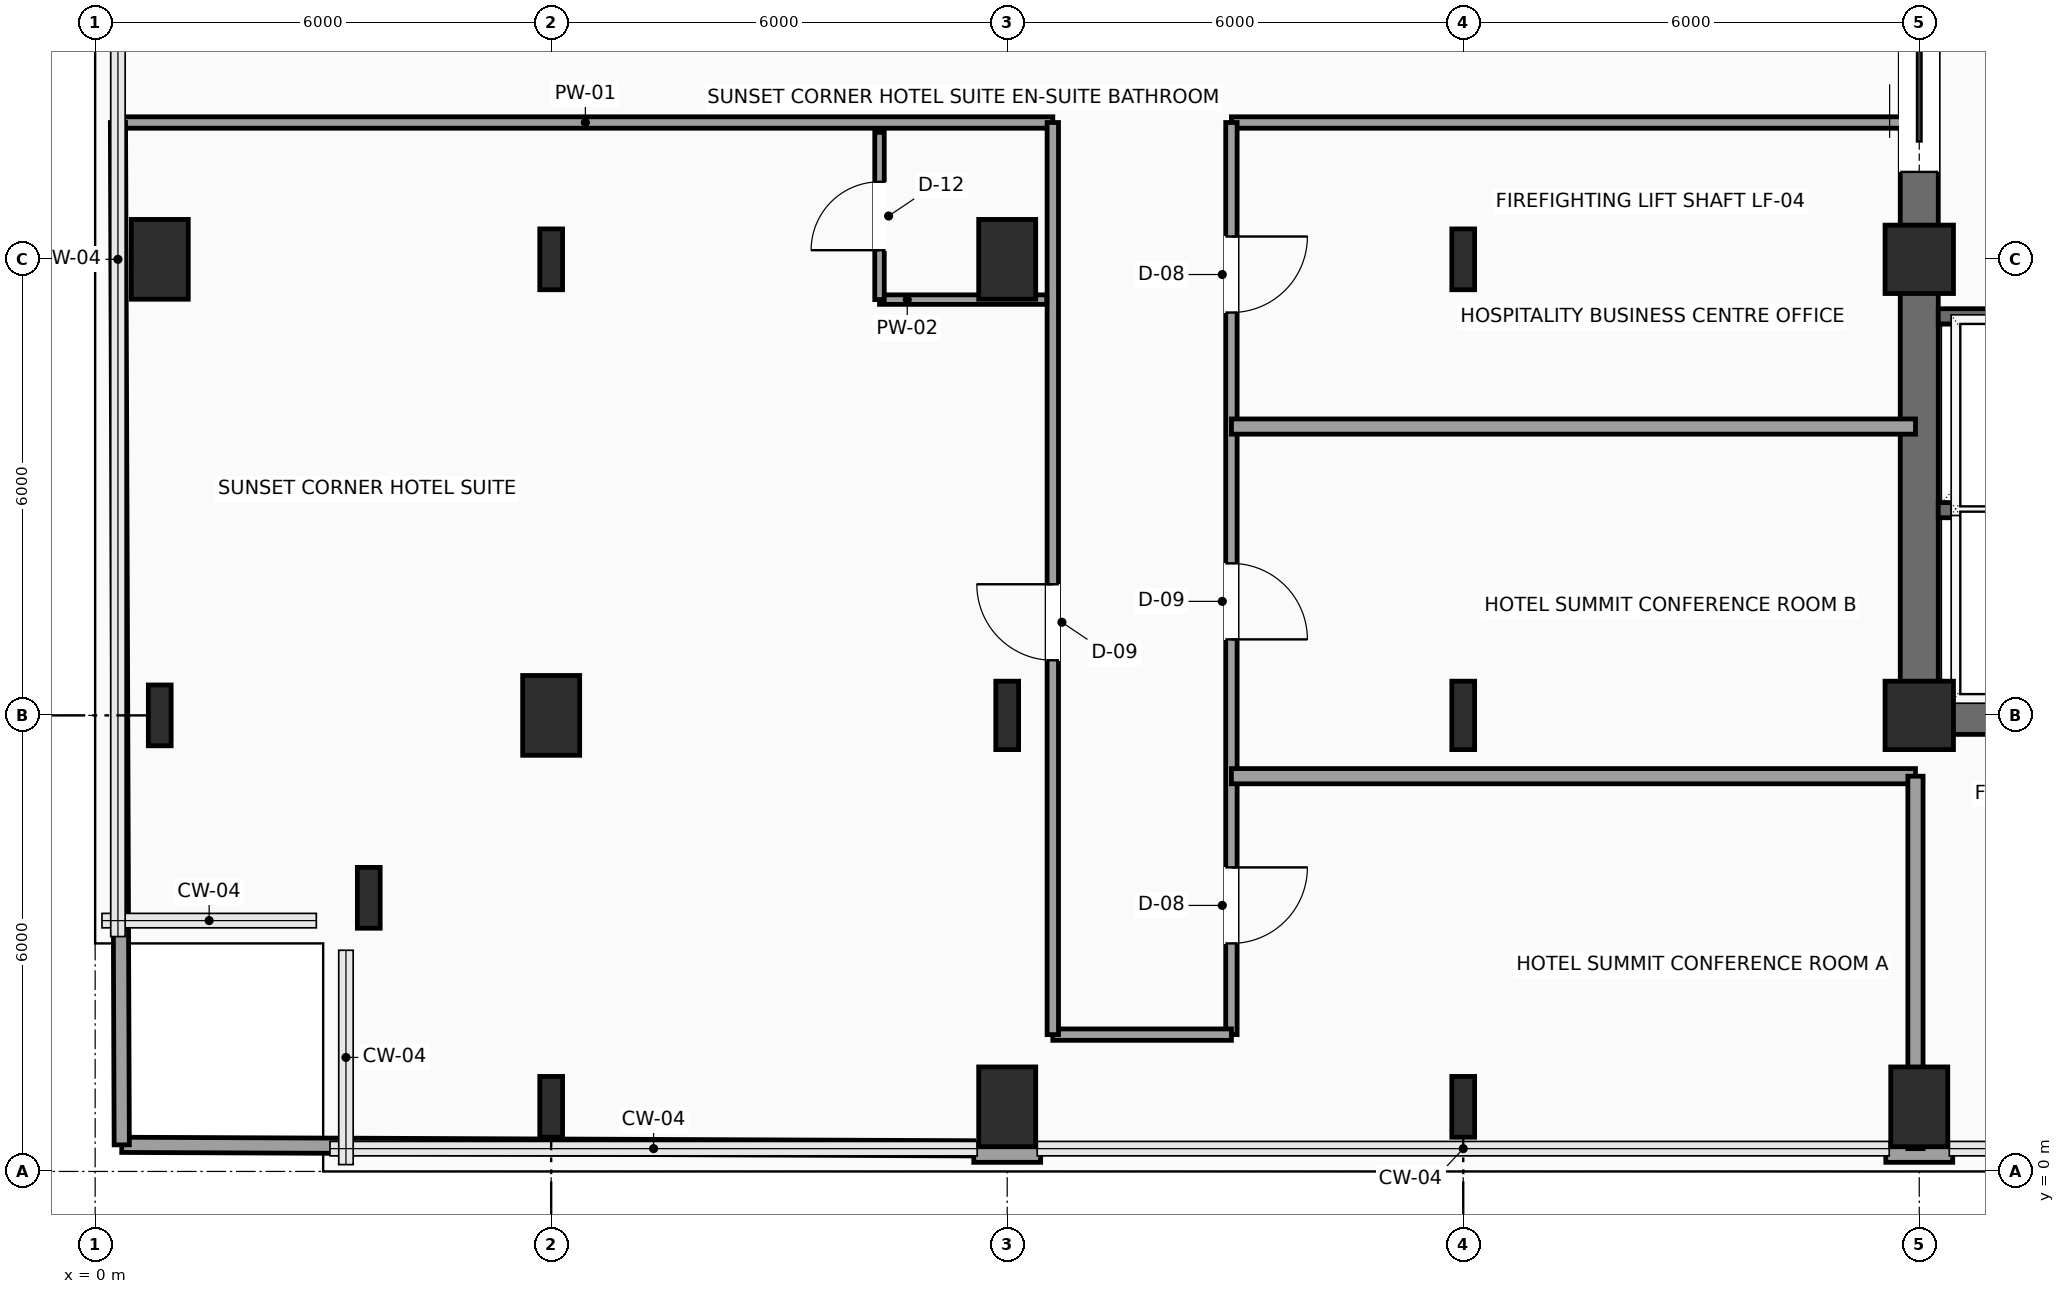
"""IFC4 building model, lengths in metres.
Left out: names, types, materials, properties, quantities, classifications, styles, units other than length and angle.
Written with IfcOpenShell. Run it as: python <this file> out.ifc"""

import sys

from ifc_helpers import new_model, si_unit, direction, frame, frame_2d, origin, origin_2d, place, context, subcontext, project, spatial, rectangle, i_section, extrude, element, fill, save


model = new_model("IFC4")
c1 = context("Model", 3, precision=1e-05, world=origin(), true_north=direction((0.0, 1.0)))
c2 = subcontext(c1, "Body", "Model", "MODEL_VIEW")
j1 = project(units=[si_unit("LENGTHUNIT", "METRE"), si_unit("PLANEANGLEUNIT", "RADIAN")], contexts=[c1])
p1 = place(None, origin())
s1 = spatial("IfcSite", under=j1, at=p1, CompositionType="ELEMENT")
p2 = place(p1, origin())
s2 = spatial("IfcBuilding", under=s1, at=p2, CompositionType="ELEMENT")
p3 = place(p2, frame((0.0, 0.0, 227.4)))
s3 = spatial("IfcBuildingStorey", under=s2, at=p3, CompositionType="ELEMENT", Elevation=227.4)
for number, where, z_axis, x_axis in (
    (1, (24.0, 6.0, 0.0), (0.0, 0.0, 1.0), (1.0, 0.0, 0.0)),
    (2, (24.0, 12.0, 0.0), (0.0, 0.0, 1.0), (1.0, 0.0, 0.0)),
):
    element("IfcColumn", number, at=place(p3, frame(where, z_axis=z_axis, x_axis=x_axis)), inside=s3, PredefinedType="COLUMN", context=c2, shape_type="SweptSolid", body=[
        extrude(rectangle(XDim=0.9, YDim=0.9, at=origin_2d()), origin(), (0.0, 0.0, 1.0), 3.75),
    ])
for number, where, z_axis, x_axis in (
    (3, (3.6, 3.6, 0.0), (0.0, 0.0, 1.0), (1.0, 0.0, 0.0)),
    (4, (0.85, 6.0, 0.0), (0.0, 0.0, 1.0), (1.0, 0.0, 0.0)),
):
    element("IfcColumn", number, at=place(p3, frame(where, z_axis=z_axis, x_axis=x_axis)), inside=s3, PredefinedType="COLUMN", context=c2, shape_type="SweptSolid", body=[
        extrude(i_section(OverallWidth=0.3, OverallDepth=0.8, WebThickness=0.018, FlangeThickness=0.033, FilletRadius=0.03, at=origin_2d()), origin(), (0.0, 0.0, 1.0), 3.75),
    ])
p4 = place(p3, frame((0.85, 12.0, 0.0), z_axis=(0.0, 0.0, 1.0), x_axis=(1.0, 0.0, 0.0)))
e5 = element("IfcColumn", 5, at=p4, inside=s3, PredefinedType="COLUMN", context=c2, shape_type="SweptSolid", body=[
    extrude(rectangle(XDim=0.75, YDim=1.05, at=origin_2d()), origin(), (0.0, 0.0, 1.0), 3.75),
])
p5 = place(p3, frame((6.0, 0.85, 0.0), z_axis=(0.0, 0.0, 1.0), x_axis=(1.0, 0.0, 0.0)))
e6 = element("IfcColumn", 6, at=p5, inside=s3, PredefinedType="COLUMN", context=c2, shape_type="SweptSolid", body=[
    extrude(i_section(OverallWidth=0.3, OverallDepth=0.8, WebThickness=0.018, FlangeThickness=0.033, FilletRadius=0.03, at=origin_2d()), origin(), (0.0, 0.0, 1.0), 3.75),
])
p6 = place(p3, frame((6.0, 6.0, 0.0), z_axis=(0.0, 0.0, 1.0), x_axis=(1.0, 0.0, 0.0)))
e7 = element("IfcColumn", 7, at=p6, inside=s3, PredefinedType="COLUMN", context=c2, shape_type="SweptSolid", body=[
    extrude(rectangle(XDim=0.75, YDim=1.05, at=origin_2d()), origin(), (0.0, 0.0, 1.0), 3.75),
])
p7 = place(p3, frame((6.0, 12.0, 0.0), z_axis=(0.0, 0.0, 1.0), x_axis=(1.0, 0.0, 0.0)))
e8 = element("IfcColumn", 8, at=p7, inside=s3, PredefinedType="COLUMN", context=c2, shape_type="SweptSolid", body=[
    extrude(i_section(OverallWidth=0.3, OverallDepth=0.8, WebThickness=0.018, FlangeThickness=0.033, FilletRadius=0.03, at=origin_2d()), origin(), (0.0, 0.0, 1.0), 3.75),
])
p8 = place(p3, frame((12.0, 0.85, 0.0), z_axis=(0.0, 0.0, 1.0), x_axis=(1.0, 0.0, 0.0)))
e9 = element("IfcColumn", 9, at=p8, inside=s3, PredefinedType="COLUMN", context=c2, shape_type="SweptSolid", body=[
    extrude(rectangle(XDim=0.75, YDim=1.05, at=origin_2d()), origin(), (0.0, 0.0, 1.0), 3.75),
])
p9 = place(p3, frame((12.0, 6.0, 0.0), z_axis=(0.0, 0.0, 1.0), x_axis=(1.0, 0.0, 0.0)))
e10 = element("IfcColumn", 10, at=p9, inside=s3, PredefinedType="COLUMN", context=c2, shape_type="SweptSolid", body=[
    extrude(i_section(OverallWidth=0.3, OverallDepth=0.9, WebThickness=0.019, FlangeThickness=0.035, FilletRadius=0.03, at=origin_2d()), origin(), (0.0, 0.0, 1.0), 3.75),
])
p10 = place(p3, frame((12.0, 12.0, 0.0), z_axis=(0.0, 0.0, 1.0), x_axis=(1.0, 0.0, 0.0)))
e11 = element("IfcColumn", 11, at=p10, inside=s3, PredefinedType="COLUMN", context=c2, shape_type="SweptSolid", body=[
    extrude(rectangle(XDim=0.75, YDim=1.05, at=origin_2d()), origin(), (0.0, 0.0, 1.0), 3.75),
])
p11 = place(p3, frame((18.0, 0.85, 0.0), z_axis=(0.0, 0.0, 1.0), x_axis=(1.0, 0.0, 0.0)))
e12 = element("IfcColumn", 12, at=p11, inside=s3, PredefinedType="COLUMN", context=c2, shape_type="SweptSolid", body=[
    extrude(i_section(OverallWidth=0.3, OverallDepth=0.8, WebThickness=0.018, FlangeThickness=0.033, FilletRadius=0.03, at=origin_2d()), origin(), (0.0, 0.0, 1.0), 3.75),
])
p12 = place(p3, frame((18.0, 6.0, 0.0), z_axis=(0.0, 0.0, 1.0), x_axis=(1.0, 0.0, 0.0)))
e13 = element("IfcColumn", 13, at=p12, inside=s3, PredefinedType="COLUMN", context=c2, shape_type="SweptSolid", body=[
    extrude(i_section(OverallWidth=0.3, OverallDepth=0.9, WebThickness=0.019, FlangeThickness=0.035, FilletRadius=0.03, at=origin_2d()), origin(), (0.0, 0.0, 1.0), 3.75),
])
p13 = place(p3, frame((18.0, 12.0, 0.0), z_axis=(0.0, 0.0, 1.0), x_axis=(1.0, 0.0, 0.0)))
e14 = element("IfcColumn", 14, at=p13, inside=s3, PredefinedType="COLUMN", context=c2, shape_type="SweptSolid", body=[
    extrude(i_section(OverallWidth=0.3, OverallDepth=0.8, WebThickness=0.018, FlangeThickness=0.033, FilletRadius=0.03, at=origin_2d()), origin(), (0.0, 0.0, 1.0), 3.75),
])
p14 = place(p3, frame((24.0, 0.85, 0.0), z_axis=(0.0, 0.0, 1.0), x_axis=(1.0, 0.0, 0.0)))
e15 = element("IfcColumn", 15, at=p14, inside=s3, PredefinedType="COLUMN", context=c2, shape_type="SweptSolid", body=[
    extrude(rectangle(XDim=0.75, YDim=1.05, at=origin_2d()), origin(), (0.0, 0.0, 1.0), 3.75),
])
for number, where, z_axis, x_axis in (
    (16, (24.44, 0.24, 0.0), (0.0, 0.0, 1.0), (-1.0, 0.0, 0.0)),
    (17, (12.44, 0.24, 0.0), (0.0, 0.0, 1.0), (-1.0, 0.0, 0.0)),
):
    element("IfcWall", number, at=place(p3, frame(where, z_axis=z_axis, x_axis=x_axis)), inside=s3, PredefinedType="SOLIDWALL", context=c2, shape_type="SweptSolid", body=[
        extrude(rectangle(XDim=0.88, YDim=0.24, at=frame_2d((0.44, 0.0))), origin(), (0.0, 0.0, 1.0), 3.54),
    ])
p15 = place(p3, frame((24.0, 6.0, 0.0), z_axis=(0.0, 0.0, 1.0), x_axis=(1.0, 0.0, 0.0)))
e18 = element("IfcWall", 18, at=p15, inside=s3, PredefinedType="SHEAR", context=c2, shape_type="SweptSolid", body=[
    extrude(rectangle(XDim=9.6, YDim=0.5, at=frame_2d((4.8, 0.0))), origin(), (0.0, 0.0, 1.0), 3.54),
])
p16 = place(p3, frame((24.0, 6.0, 0.0), z_axis=(0.0, 0.0, 1.0), x_axis=(0.0, 1.0, 0.0)))
e19 = element("IfcWall", 19, at=p16, inside=s3, PredefinedType="SHEAR", context=c2, shape_type="SweptSolid", body=[
    extrude(rectangle(XDim=12.0, YDim=0.5, at=frame_2d((6.0, 0.0))), origin(), (0.0, 0.0, 1.0), 3.54),
])
p17 = place(p16, frame((7.15, 0.0, 0.0)))
e20 = element("IfcOpeningElement", 20, at=p17, cuts=e19, PredefinedType="OPENING", context=c2, shape_type="SweptSolid", body=[
    extrude(rectangle(XDim=1.6, YDim=2.3, at=frame_2d((0.8, 1.15))), frame((0.0, 0.26, 0.0), z_axis=(0.0, -1.0, 0.0), x_axis=(1.0, 0.0, 0.0)), (0.0, 0.0, 1.0), 0.52),
])
for number, where, z_axis, x_axis in (
    (21, (24.25, 8.7, 0.0), (0.0, 0.0, 1.0), (1.0, 0.0, 0.0)),
    (22, (24.25, 11.25, 0.0), (0.0, 0.0, 1.0), (1.0, 0.0, 0.0)),
):
    element("IfcWall", number, at=place(p3, frame(where, z_axis=z_axis, x_axis=x_axis)), inside=s3, PredefinedType="SHEAR", context=c2, shape_type="SweptSolid", body=[
        extrude(rectangle(XDim=2.17, YDim=0.2, at=frame_2d((1.085, 0.0))), origin(), (0.0, 0.0, 1.0), 3.54),
    ])
p18 = place(p3, frame((12.6, 13.8, 0.0), z_axis=(0.0, 0.0, 1.0), x_axis=(-1.0, 0.0, 0.0)))
e23 = element("IfcWall", 23, at=p18, inside=s3, PredefinedType="PARTITIONING", context=c2, shape_type="SweptSolid", body=[
    extrude(rectangle(XDim=12.3, YDim=0.15, at=frame_2d((6.15, 0.0))), origin(), (0.0, 0.0, 1.0), 3.54),
])
p19 = place(p3, frame((23.95, 13.8, 0.0), z_axis=(0.0, 0.0, 1.0), x_axis=(-1.0, 0.0, 0.0)))
e24 = element("IfcWall", 24, at=p19, inside=s3, PredefinedType="PARTITIONING", context=c2, shape_type="SweptSolid", body=[
    extrude(rectangle(XDim=9.0, YDim=0.15, at=frame_2d((4.5, 0.0))), origin(), (0.0, 0.0, 1.0), 3.54),
])
p20 = place(p3, frame((14.95, 13.8, 0.0), z_axis=(0.0, 0.0, 1.0), x_axis=(0.0, -1.0, 0.0)))
e25 = element("IfcWall", 25, at=p20, inside=s3, PredefinedType="PARTITIONING", context=c2, shape_type="SweptSolid", body=[
    extrude(rectangle(XDim=12.0, YDim=0.15, at=frame_2d((6.0, 0.0))), origin(), (0.0, 0.0, 1.0), 3.54),
])
p21 = place(p20, frame((9.8, 0.0, 0.0)))
e26 = element("IfcOpeningElement", 26, at=p21, cuts=e25, PredefinedType="OPENING", context=c2, shape_type="SweptSolid", body=[
    extrude(rectangle(XDim=1.0, YDim=2.2, at=frame_2d((0.5, 1.1))), frame((0.0, 0.085, 0.0), z_axis=(0.0, -1.0, 0.0), x_axis=(1.0, 0.0, 0.0)), (0.0, 0.0, 1.0), 0.17),
])
p22 = place(p20, frame((5.8, 0.0, 0.0)))
e27 = element("IfcOpeningElement", 27, at=p22, cuts=e25, PredefinedType="OPENING", context=c2, shape_type="SweptSolid", body=[
    extrude(rectangle(XDim=1.0, YDim=2.2, at=frame_2d((0.5, 1.1))), frame((0.0, 0.085, 0.0), z_axis=(0.0, -1.0, 0.0), x_axis=(1.0, 0.0, 0.0)), (0.0, 0.0, 1.0), 0.17),
])
p23 = place(p20, frame((1.5, 0.0, 0.0)))
e28 = element("IfcOpeningElement", 28, at=p23, cuts=e25, PredefinedType="OPENING", context=c2, shape_type="SweptSolid", body=[
    extrude(rectangle(XDim=1.0, YDim=2.2, at=frame_2d((0.5, 1.1))), frame((0.0, 0.085, 0.0), z_axis=(0.0, -1.0, 0.0), x_axis=(1.0, 0.0, 0.0)), (0.0, 0.0, 1.0), 0.17),
])
p24 = place(p3, frame((14.95, 1.8, 0.0), z_axis=(0.0, 0.0, 1.0), x_axis=(-1.0, 0.0, 0.0)))
e29 = element("IfcWall", 29, at=p24, inside=s3, PredefinedType="PARTITIONING", context=c2, shape_type="SweptSolid", body=[
    extrude(rectangle(XDim=2.35, YDim=0.15, at=frame_2d((1.175, 0.0))), origin(), (0.0, 0.0, 1.0), 3.54),
])
p25 = place(p3, frame((12.6, 1.8, 0.0), z_axis=(0.0, 0.0, 1.0), x_axis=(0.0, 1.0, 0.0)))
e30 = element("IfcWall", 30, at=p25, inside=s3, PredefinedType="PARTITIONING", context=c2, shape_type="SweptSolid", body=[
    extrude(rectangle(XDim=12.0, YDim=0.15, at=frame_2d((6.0, 0.0))), origin(), (0.0, 0.0, 1.0), 3.54),
])
p26 = place(p25, frame((4.925, 0.0, 0.0)))
e31 = element("IfcOpeningElement", 31, at=p26, cuts=e30, PredefinedType="OPENING", context=c2, shape_type="SweptSolid", body=[
    extrude(rectangle(XDim=1.0, YDim=2.2, at=frame_2d((0.5, 1.1))), frame((0.0, 0.085, 0.0), z_axis=(0.0, -1.0, 0.0), x_axis=(1.0, 0.0, 0.0)), (0.0, 0.0, 1.0), 0.17),
])
p27 = place(p3, frame((0.35, 0.35, 0.0), z_axis=(0.0, 0.0, 1.0), x_axis=(0.999991617913, -0.004094398993, 0.0)))
e32 = element("IfcWall", 32, at=p27, inside=s3, PredefinedType="PARTITIONING", context=c2, shape_type="SweptSolid", body=[
    extrude(rectangle(XDim=11.21, YDim=0.2, at=frame_2d((5.605, 0.0))), origin(), (0.0, 0.0, 1.0), 3.54),
])
p28 = place(p3, frame((0.35, 0.35, 0.0), z_axis=(0.0, 0.0, 1.0), x_axis=(-0.003721090209, 0.99999307672, 0.0)))
e33 = element("IfcWall", 33, at=p28, inside=s3, PredefinedType="PARTITIONING", context=c2, shape_type="SweptSolid", body=[
    extrude(rectangle(XDim=13.45, YDim=0.2, at=frame_2d((6.725, 0.0))), origin(), (0.0, 0.0, 1.0), 3.54),
])
p29 = place(p3, frame((10.32, 11.47, 0.0), z_axis=(0.0, 0.0, 1.0), x_axis=(1.0, 0.0, 0.0)))
e34 = element("IfcWall", 34, at=p29, inside=s3, PredefinedType="PARTITIONING", context=c2, shape_type="SweptSolid", body=[
    extrude(rectangle(XDim=2.2, YDim=0.125, at=frame_2d((1.1, 0.0))), origin(), (0.0, 0.0, 1.0), 3.54),
])
p30 = place(p3, frame((10.32, 11.47, 0.0), z_axis=(0.0, 0.0, 1.0), x_axis=(0.0, 1.0, 0.0)))
e35 = element("IfcWall", 35, at=p30, inside=s3, PredefinedType="PARTITIONING", context=c2, shape_type="SweptSolid", body=[
    extrude(rectangle(XDim=2.2, YDim=0.125, at=frame_2d((1.1, 0.0))), origin(), (0.0, 0.0, 1.0), 3.54),
])
p31 = place(p30, frame((0.65, 0.0, 0.0)))
e36 = element("IfcOpeningElement", 36, at=p31, cuts=e35, PredefinedType="OPENING", context=c2, shape_type="SweptSolid", body=[
    extrude(rectangle(XDim=0.9, YDim=2.1, at=frame_2d((0.45, 1.05))), frame((0.0, 0.073, 0.0), z_axis=(0.0, -1.0, 0.0), x_axis=(1.0, 0.0, 0.0)), (0.0, 0.0, 1.0), 0.145),
])
p32 = place(p3, frame((14.95, 5.2, 0.0), z_axis=(0.0, 0.0, 1.0), x_axis=(1.0, 0.0, 0.0)))
e37 = element("IfcWall", 37, at=p32, inside=s3, PredefinedType="PARTITIONING", context=c2, shape_type="SweptSolid", body=[
    extrude(rectangle(XDim=9.0, YDim=0.2, at=frame_2d((4.5, 0.0))), origin(), (0.0, 0.0, 1.0), 3.54),
])
p33 = place(p3, frame((23.95, 0.3, 0.0), z_axis=(0.0, 0.0, 1.0), x_axis=(0.0, 1.0, 0.0)))
e38 = element("IfcWall", 38, at=p33, inside=s3, PredefinedType="PARTITIONING", context=c2, shape_type="SweptSolid", body=[
    extrude(rectangle(XDim=4.9, YDim=0.2, at=frame_2d((2.45, 0.0))), origin(), (0.0, 0.0, 1.0), 3.132),
])
p34 = place(p3, frame((14.95, 9.8, 0.0), z_axis=(0.0, 0.0, 1.0), x_axis=(1.0, 0.0, 0.0)))
e39 = element("IfcWall", 39, at=p34, inside=s3, PredefinedType="PARTITIONING", context=c2, shape_type="SweptSolid", body=[
    extrude(rectangle(XDim=9.0, YDim=0.2, at=frame_2d((4.5, 0.0))), origin(), (0.0, 0.0, 1.0), 3.54),
])
p35 = place(p17, origin())
e40 = element("IfcDoor", 40, at=p35, inside=s3, OperationType="DOUBLE_DOOR_SLIDING", PredefinedType="DOOR", context=c2, shape_type="SweptSolid", body=[
    extrude(rectangle(XDim=1.6, YDim=2.3, at=frame_2d((0.8, 1.15))), frame((0.0, 0.025, 0.0), z_axis=(0.0, -1.0, 0.0), x_axis=(1.0, 0.0, 0.0)), (0.0, 0.0, 1.0), 0.05),
])
fill(e20, e40)
p36 = place(p21, origin())
e41 = element("IfcDoor", 41, at=p36, inside=s3, OperationType="SINGLE_SWING_LEFT", PredefinedType="DOOR", context=c2, shape_type="SweptSolid", body=[
    extrude(rectangle(XDim=1.0, YDim=2.2, at=frame_2d((0.5, 1.1))), frame((0.0, 0.025, 0.0), z_axis=(0.0, -1.0, 0.0), x_axis=(1.0, 0.0, 0.0)), (0.0, 0.0, 1.0), 0.05),
])
fill(e26, e41)
p37 = place(p22, origin())
e42 = element("IfcDoor", 42, at=p37, inside=s3, OperationType="SINGLE_SWING_RIGHT", PredefinedType="DOOR", context=c2, shape_type="SweptSolid", body=[
    extrude(rectangle(XDim=1.0, YDim=2.2, at=frame_2d((0.5, 1.1))), frame((0.0, 0.025, 0.0), z_axis=(0.0, -1.0, 0.0), x_axis=(1.0, 0.0, 0.0)), (0.0, 0.0, 1.0), 0.05),
])
fill(e27, e42)
p38 = place(p23, origin())
e43 = element("IfcDoor", 43, at=p38, inside=s3, OperationType="SINGLE_SWING_LEFT", PredefinedType="DOOR", context=c2, shape_type="SweptSolid", body=[
    extrude(rectangle(XDim=1.0, YDim=2.2, at=frame_2d((0.5, 1.1))), frame((0.0, 0.025, 0.0), z_axis=(0.0, -1.0, 0.0), x_axis=(1.0, 0.0, 0.0)), (0.0, 0.0, 1.0), 0.05),
])
fill(e28, e43)
p39 = place(p26, origin())
e44 = element("IfcDoor", 44, at=p39, inside=s3, OperationType="SINGLE_SWING_RIGHT", PredefinedType="DOOR", context=c2, shape_type="SweptSolid", body=[
    extrude(rectangle(XDim=1.0, YDim=2.2, at=frame_2d((0.5, 1.1))), frame((0.0, 0.025, 0.0), z_axis=(0.0, -1.0, 0.0), x_axis=(1.0, 0.0, 0.0)), (0.0, 0.0, 1.0), 0.05),
])
fill(e31, e44)
p40 = place(p31, origin())
e45 = element("IfcDoor", 45, at=p40, inside=s3, OperationType="SINGLE_SWING_LEFT", PredefinedType="DOOR", context=c2, shape_type="SweptSolid", body=[
    extrude(rectangle(XDim=0.9, YDim=2.1, at=frame_2d((0.45, 1.05))), frame((0.0, 0.025, 0.0), z_axis=(0.0, -1.0, 0.0), x_axis=(1.0, 0.0, 0.0)), (0.0, 0.0, 1.0), 0.05),
])
fill(e36, e45)
save(model, sys.argv[1])
